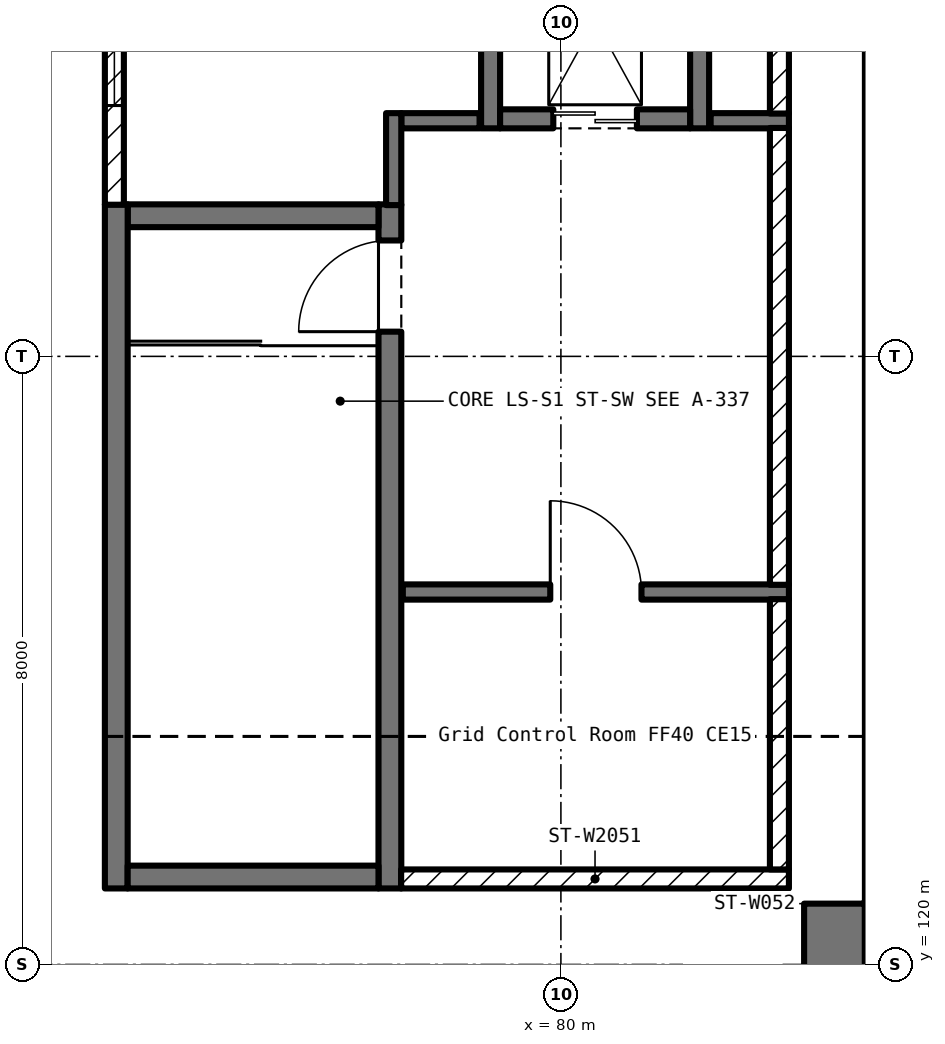
"""IFC4 building model, lengths in metres.
Left out: names, types, materials, properties, quantities, classifications, styles, units other than length and angle.
Written with IfcOpenShell. Run it as: python <this file> out.ifc"""

import sys

from ifc_helpers import new_model, si_unit, direction, frame, frame_2d, origin, place, context, subcontext, project, spatial, rectangle, extrude, element, fill, save


model = new_model("IFC4")
c1 = context("Model", 3, precision=1e-05, world=origin(), true_north=direction((0.0, 1.0)))
c2 = subcontext(c1, "Body", "Model", "MODEL_VIEW")
j1 = project(units=[si_unit("LENGTHUNIT", "METRE"), si_unit("PLANEANGLEUNIT", "RADIAN")], contexts=[c1])
p1 = place(None, origin())
s1 = spatial("IfcSite", under=j1, at=p1, CompositionType="ELEMENT")
p2 = place(p1, origin())
s2 = spatial("IfcBuilding", under=s1, at=p2, CompositionType="ELEMENT")
p3 = place(p2, frame((0.0, 0.0, 34.0)))
s3 = spatial("IfcBuildingStorey", under=s2, at=p3, CompositionType="ELEMENT", Elevation=34.0)
p4 = place(p3, frame((83.6, 95.2, 0.0), z_axis=(0.0, 0.0, 1.0), x_axis=(0.0, 1.0, 0.0)))
e1 = element("IfcWall", 1, at=p4, inside=s3, PredefinedType="SHEAR", context=c2, shape_type="SweptSolid", body=[
    extrude(rectangle(XDim=25.6, YDim=0.8, at=frame_2d((12.8, 0.0))), origin(), (0.0, 0.0, 1.0), 12.5),
])
p5 = place(p4, frame((1.1, 0.0, 2.6)))
e2 = element("IfcOpeningElement", 2, at=p5, cuts=e1, PredefinedType="OPENING", context=c2, shape_type="SweptSolid", body=[
    extrude(rectangle(XDim=2.4, YDim=1.2, at=frame_2d((1.2, 0.6))), frame((0.0, 0.412, 0.0), z_axis=(0.0, -1.0, 0.0), x_axis=(1.0, 0.0, 0.0)), (0.0, 0.0, 1.0), 0.824),
])
p6 = place(p4, frame((4.1, 0.0, 2.6)))
e3 = element("IfcOpeningElement", 3, at=p6, cuts=e1, PredefinedType="OPENING", context=c2, shape_type="SweptSolid", body=[
    extrude(rectangle(XDim=2.4, YDim=1.2, at=frame_2d((1.2, 0.6))), frame((0.0, 0.412, 0.0), z_axis=(0.0, -1.0, 0.0), x_axis=(1.0, 0.0, 0.0)), (0.0, 0.0, 1.0), 0.824),
])
p7 = place(p4, frame((7.1, 0.0, 2.6)))
e4 = element("IfcOpeningElement", 4, at=p7, cuts=e1, PredefinedType="OPENING", context=c2, shape_type="SweptSolid", body=[
    extrude(rectangle(XDim=2.4, YDim=1.2, at=frame_2d((1.2, 0.6))), frame((0.0, 0.412, 0.0), z_axis=(0.0, -1.0, 0.0), x_axis=(1.0, 0.0, 0.0)), (0.0, 0.0, 1.0), 0.824),
])
p8 = place(p4, frame((10.1, 0.0, 2.6)))
e5 = element("IfcOpeningElement", 5, at=p8, cuts=e1, PredefinedType="OPENING", context=c2, shape_type="SweptSolid", body=[
    extrude(rectangle(XDim=2.4, YDim=1.2, at=frame_2d((1.2, 0.6))), frame((0.0, 0.412, 0.0), z_axis=(0.0, -1.0, 0.0), x_axis=(1.0, 0.0, 0.0)), (0.0, 0.0, 1.0), 0.824),
])
p9 = place(p4, frame((13.1, 0.0, 2.6)))
e6 = element("IfcOpeningElement", 6, at=p9, cuts=e1, PredefinedType="OPENING", context=c2, shape_type="SweptSolid", body=[
    extrude(rectangle(XDim=2.4, YDim=1.2, at=frame_2d((1.2, 0.6))), frame((0.0, 0.412, 0.0), z_axis=(0.0, -1.0, 0.0), x_axis=(1.0, 0.0, 0.0)), (0.0, 0.0, 1.0), 0.824),
])
p10 = place(p4, frame((16.1, 0.0, 2.6)))
e7 = element("IfcOpeningElement", 7, at=p10, cuts=e1, PredefinedType="OPENING", context=c2, shape_type="SweptSolid", body=[
    extrude(rectangle(XDim=2.4, YDim=1.2, at=frame_2d((1.2, 0.6))), frame((0.0, 0.412, 0.0), z_axis=(0.0, -1.0, 0.0), x_axis=(1.0, 0.0, 0.0)), (0.0, 0.0, 1.0), 0.824),
])
p11 = place(p4, frame((19.1, 0.0, 2.6)))
e8 = element("IfcOpeningElement", 8, at=p11, cuts=e1, PredefinedType="OPENING", context=c2, shape_type="SweptSolid", body=[
    extrude(rectangle(XDim=2.4, YDim=1.2, at=frame_2d((1.2, 0.6))), frame((0.0, 0.412, 0.0), z_axis=(0.0, -1.0, 0.0), x_axis=(1.0, 0.0, 0.0)), (0.0, 0.0, 1.0), 0.824),
])
p12 = place(p4, frame((22.1, 0.0, 2.6)))
e9 = element("IfcOpeningElement", 9, at=p12, cuts=e1, PredefinedType="OPENING", context=c2, shape_type="SweptSolid", body=[
    extrude(rectangle(XDim=2.4, YDim=1.2, at=frame_2d((1.2, 0.6))), frame((0.0, 0.412, 0.0), z_axis=(0.0, -1.0, 0.0), x_axis=(1.0, 0.0, 0.0)), (0.0, 0.0, 1.0), 0.824),
])
p13 = place(p4, frame((1.1, 0.0, 9.1)))
e10 = element("IfcOpeningElement", 10, at=p13, cuts=e1, PredefinedType="OPENING", context=c2, shape_type="SweptSolid", body=[
    extrude(rectangle(XDim=2.4, YDim=0.9, at=frame_2d((1.2, 0.45))), frame((0.0, 0.412, 0.0), z_axis=(0.0, -1.0, 0.0), x_axis=(1.0, 0.0, 0.0)), (0.0, 0.0, 1.0), 0.824),
])
p14 = place(p4, frame((4.1, 0.0, 9.1)))
e11 = element("IfcOpeningElement", 11, at=p14, cuts=e1, PredefinedType="OPENING", context=c2, shape_type="SweptSolid", body=[
    extrude(rectangle(XDim=2.4, YDim=0.9, at=frame_2d((1.2, 0.45))), frame((0.0, 0.412, 0.0), z_axis=(0.0, -1.0, 0.0), x_axis=(1.0, 0.0, 0.0)), (0.0, 0.0, 1.0), 0.824),
])
p15 = place(p4, frame((7.1, 0.0, 9.1)))
e12 = element("IfcOpeningElement", 12, at=p15, cuts=e1, PredefinedType="OPENING", context=c2, shape_type="SweptSolid", body=[
    extrude(rectangle(XDim=2.4, YDim=0.9, at=frame_2d((1.2, 0.45))), frame((0.0, 0.412, 0.0), z_axis=(0.0, -1.0, 0.0), x_axis=(1.0, 0.0, 0.0)), (0.0, 0.0, 1.0), 0.824),
])
p16 = place(p4, frame((10.1, 0.0, 9.1)))
e13 = element("IfcOpeningElement", 13, at=p16, cuts=e1, PredefinedType="OPENING", context=c2, shape_type="SweptSolid", body=[
    extrude(rectangle(XDim=2.4, YDim=0.9, at=frame_2d((1.2, 0.45))), frame((0.0, 0.412, 0.0), z_axis=(0.0, -1.0, 0.0), x_axis=(1.0, 0.0, 0.0)), (0.0, 0.0, 1.0), 0.824),
])
p17 = place(p4, frame((13.1, 0.0, 9.1)))
e14 = element("IfcOpeningElement", 14, at=p17, cuts=e1, PredefinedType="OPENING", context=c2, shape_type="SweptSolid", body=[
    extrude(rectangle(XDim=2.4, YDim=0.9, at=frame_2d((1.2, 0.45))), frame((0.0, 0.412, 0.0), z_axis=(0.0, -1.0, 0.0), x_axis=(1.0, 0.0, 0.0)), (0.0, 0.0, 1.0), 0.824),
])
p18 = place(p4, frame((16.1, 0.0, 9.1)))
e15 = element("IfcOpeningElement", 15, at=p18, cuts=e1, PredefinedType="OPENING", context=c2, shape_type="SweptSolid", body=[
    extrude(rectangle(XDim=2.4, YDim=0.9, at=frame_2d((1.2, 0.45))), frame((0.0, 0.412, 0.0), z_axis=(0.0, -1.0, 0.0), x_axis=(1.0, 0.0, 0.0)), (0.0, 0.0, 1.0), 0.824),
])
p19 = place(p4, frame((19.1, 0.0, 9.1)))
e16 = element("IfcOpeningElement", 16, at=p19, cuts=e1, PredefinedType="OPENING", context=c2, shape_type="SweptSolid", body=[
    extrude(rectangle(XDim=2.4, YDim=0.9, at=frame_2d((1.2, 0.45))), frame((0.0, 0.412, 0.0), z_axis=(0.0, -1.0, 0.0), x_axis=(1.0, 0.0, 0.0)), (0.0, 0.0, 1.0), 0.824),
])
p20 = place(p4, frame((22.1, 0.0, 9.1)))
e17 = element("IfcOpeningElement", 17, at=p20, cuts=e1, PredefinedType="OPENING", context=c2, shape_type="SweptSolid", body=[
    extrude(rectangle(XDim=2.4, YDim=0.9, at=frame_2d((1.2, 0.45))), frame((0.0, 0.412, 0.0), z_axis=(0.0, -1.0, 0.0), x_axis=(1.0, 0.0, 0.0)), (0.0, 0.0, 1.0), 0.824),
])
p21 = place(p3, frame((77.75, 121.0, 0.0), z_axis=(0.0, 0.0, 1.0), x_axis=(0.0, 1.0, 0.0)))
e18 = element("IfcWall", 18, at=p21, inside=s3, PredefinedType="SOLIDWALL", context=c2, shape_type="SweptSolid", body=[
    extrude(rectangle(XDim=9.0, YDim=0.3, at=frame_2d((4.5, 0.0))), origin(), (0.0, 0.0, 1.0), 5.75),
])
p22 = place(p21, frame((7.325, 0.0, 0.0)))
e19 = element("IfcOpeningElement", 19, at=p22, cuts=e18, PredefinedType="OPENING", context=c2, shape_type="SweptSolid", body=[
    extrude(rectangle(XDim=1.2, YDim=2.1, at=frame_2d((0.6, 1.05))), frame((0.0, 0.162, 0.0), z_axis=(0.0, -1.0, 0.0), x_axis=(1.0, 0.0, 0.0)), (0.0, 0.0, 1.0), 0.324),
])
p23 = place(p3, frame((77.6, 129.85, 0.0), z_axis=(0.0, 0.0, 1.0), x_axis=(-1.0, 0.0, 0.0)))
e20 = element("IfcWall", 20, at=p23, inside=s3, PredefinedType="SOLIDWALL", context=c2, shape_type="SweptSolid", body=[
    extrude(rectangle(XDim=3.3, YDim=0.3, at=frame_2d((1.65, 0.0))), origin(), (0.0, 0.0, 1.0), 5.75),
])
p24 = place(p3, frame((74.15, 130.0, 0.0), z_axis=(0.0, 0.0, 1.0), x_axis=(0.0, -1.0, 0.0)))
e21 = element("IfcWall", 21, at=p24, inside=s3, PredefinedType="SOLIDWALL", context=c2, shape_type="SweptSolid", body=[
    extrude(rectangle(XDim=9.0, YDim=0.3, at=frame_2d((4.5, 0.0))), origin(), (0.0, 0.0, 1.0), 5.75),
])
p25 = place(p3, frame((74.3, 121.15, 0.0), z_axis=(0.0, 0.0, 1.0), x_axis=(1.0, 0.0, 0.0)))
e22 = element("IfcWall", 22, at=p25, inside=s3, PredefinedType="SOLIDWALL", context=c2, shape_type="SweptSolid", body=[
    extrude(rectangle(XDim=3.3, YDim=0.3, at=frame_2d((1.65, 0.0))), origin(), (0.0, 0.0, 1.0), 5.75),
])
for number, where, z_axis, x_axis in (
    (23, (81.825, 131.0, 0.0), (0.0, 0.0, 1.0), (0.0, 1.0, 0.0)),
    (24, (79.075, 135.0, 0.0), (0.0, 0.0, 1.0), (0.0, -1.0, 0.0)),
):
    element("IfcWall", number, at=place(p3, frame(where, z_axis=z_axis, x_axis=x_axis)), inside=s3, PredefinedType="SOLIDWALL", context=c2, shape_type="SweptSolid", body=[
        extrude(rectangle(XDim=4.0, YDim=0.25, at=frame_2d((2.0, 0.0))), origin(), (0.0, 0.0, 1.0), 5.75),
    ])
p26 = place(p3, frame((79.2, 131.125, 0.0), z_axis=(0.0, 0.0, 1.0), x_axis=(1.0, 0.0, 0.0)))
e25 = element("IfcWall", 25, at=p26, inside=s3, PredefinedType="SOLIDWALL", context=c2, shape_type="SweptSolid", body=[
    extrude(rectangle(XDim=2.5, YDim=0.25, at=frame_2d((1.25, 0.0))), origin(), (0.0, 0.0, 1.0), 5.75),
])
p27 = place(p26, frame((0.7, 0.0, 0.0)))
e26 = element("IfcOpeningElement", 26, at=p27, cuts=e25, PredefinedType="OPENING", context=c2, shape_type="SweptSolid", body=[
    extrude(rectangle(XDim=1.1, YDim=2.1, at=frame_2d((0.55, 1.05))), frame((0.0, 0.137, 0.0), z_axis=(0.0, -1.0, 0.0), x_axis=(1.0, 0.0, 0.0)), (0.0, 0.0, 1.0), 0.274),
])
for number, where, z_axis, x_axis in (
    (27, (83.0, 131.1, 0.0), (0.0, 0.0, 1.0), (-1.0, 0.0, 0.0)),
    (28, (78.93, 131.1, 0.0), (0.0, 0.0, 1.0), (-1.0, 0.0, 0.0)),
):
    element("IfcWall", number, at=place(p3, frame(where, z_axis=z_axis, x_axis=x_axis)), inside=s3, PredefinedType="PARTITIONING", context=c2, shape_type="SweptSolid", body=[
        extrude(rectangle(XDim=1.03, YDim=0.2, at=frame_2d((0.515, 0.0))), origin(), (0.0, 0.0, 1.0), 5.75),
    ])
p28 = place(p3, frame((77.8, 131.2, 0.0), z_axis=(0.0, 0.0, 1.0), x_axis=(0.0, -1.0, 0.0)))
e29 = element("IfcWall", 29, at=p28, inside=s3, PredefinedType="PARTITIONING", context=c2, shape_type="SweptSolid", body=[
    extrude(rectangle(XDim=1.21, YDim=0.2, at=frame_2d((0.605, 0.0))), origin(), (0.0, 0.0, 1.0), 5.75),
])
p29 = place(p3, frame((77.92, 124.9, 0.0), z_axis=(0.0, 0.0, 1.0), x_axis=(1.0, 0.0, 0.0)))
e30 = element("IfcWall", 30, at=p29, inside=s3, PredefinedType="PARTITIONING", context=c2, shape_type="SweptSolid", body=[
    extrude(rectangle(XDim=5.08, YDim=0.2, at=frame_2d((2.54, 0.0))), origin(), (0.0, 0.0, 1.0), 5.75),
])
p30 = place(p29, frame((1.94, 0.0, 0.0)))
e31 = element("IfcOpeningElement", 31, at=p30, cuts=e30, PredefinedType="OPENING", context=c2, shape_type="SweptSolid", body=[
    extrude(rectangle(XDim=1.2, YDim=2.1, at=frame_2d((0.6, 1.05))), frame((0.0, 0.112, 0.0), z_axis=(0.0, -1.0, 0.0), x_axis=(1.0, 0.0, 0.0)), (0.0, 0.0, 1.0), 0.224),
])
p31 = place(p3, frame((77.898, 121.125, 0.0), z_axis=(0.0, 0.0, 1.0), x_axis=(1.0, 0.0, 0.0)))
e32 = element("IfcWall", 32, at=p31, inside=s3, PredefinedType="SOLIDWALL", context=c2, shape_type="SweptSolid", body=[
    extrude(rectangle(XDim=5.102, YDim=0.25, at=frame_2d((2.551, 0.0))), origin(), (0.0, 0.0, 1.0), 5.75),
])
p32 = place(p3, frame((82.875, 121.25, 0.0), z_axis=(0.0, 0.0, 1.0), x_axis=(0.0, 1.0, 0.0)))
e33 = element("IfcWall", 33, at=p32, inside=s3, PredefinedType="SOLIDWALL", context=c2, shape_type="SweptSolid", body=[
    extrude(rectangle(XDim=3.555, YDim=0.25, at=frame_2d((1.777, 0.0))), origin(), (0.0, 0.0, 1.0), 5.75),
])
p33 = place(p3, frame((82.875, 124.995, 0.0), z_axis=(0.0, 0.0, 1.0), x_axis=(0.0, 1.0, 0.0)))
e34 = element("IfcWall", 34, at=p33, inside=s3, PredefinedType="SOLIDWALL", context=c2, shape_type="SweptSolid", body=[
    extrude(rectangle(XDim=6.01, YDim=0.25, at=frame_2d((3.005, 0.0))), origin(), (0.0, 0.0, 1.0), 5.75),
])
p34 = place(p3, frame((82.875, 131.195, 0.0), z_axis=(0.0, 0.0, 1.0), x_axis=(0.0, 1.0, 0.0)))
e35 = element("IfcWall", 35, at=p34, inside=s3, PredefinedType="SOLIDWALL", context=c2, shape_type="SweptSolid", body=[
    extrude(rectangle(XDim=3.805, YDim=0.25, at=frame_2d((1.902, 0.0))), origin(), (0.0, 0.0, 1.0), 5.75),
])
p35 = place(p3, frame((74.125, 134.75, 0.0), z_axis=(0.0, 0.0, 1.0), x_axis=(0.0, -1.0, 0.0)))
e36 = element("IfcWall", 36, at=p35, inside=s3, PredefinedType="SOLIDWALL", context=c2, shape_type="SweptSolid", body=[
    extrude(rectangle(XDim=4.755, YDim=0.25, at=frame_2d((2.377, 0.0))), origin(), (0.0, 0.0, 1.0), 5.75),
])
p36 = place(p35, frame((1.05, 0.0, 2.6)))
e37 = element("IfcOpeningElement", 37, at=p36, cuts=e36, PredefinedType="OPENING", context=c2, shape_type="SweptSolid", body=[
    extrude(rectangle(XDim=2.4, YDim=1.2, at=frame_2d((1.2, 0.6))), frame((0.0, 0.137, 0.0), z_axis=(0.0, -1.0, 0.0), x_axis=(1.0, 0.0, 0.0)), (0.0, 0.0, 1.0), 0.274),
])
p37 = place(p22, origin())
e38 = element("IfcDoor", 38, at=p37, inside=s3, OperationType="SINGLE_SWING_LEFT", PredefinedType="DOOR", context=c2, shape_type="SweptSolid", body=[
    extrude(rectangle(XDim=1.2, YDim=2.1, at=frame_2d((0.6, 1.05))), frame((0.0, 0.025, 0.0), z_axis=(0.0, -1.0, 0.0), x_axis=(1.0, 0.0, 0.0)), (0.0, 0.0, 1.0), 0.05),
])
fill(e19, e38)
p38 = place(p27, origin())
e39 = element("IfcDoor", 39, at=p38, inside=s3, OperationType="DOUBLE_DOOR_SLIDING", PredefinedType="DOOR", context=c2, shape_type="SweptSolid", body=[
    extrude(rectangle(XDim=1.1, YDim=2.1, at=frame_2d((0.55, 1.05))), frame((0.0, 0.025, 0.0), z_axis=(0.0, -1.0, 0.0), x_axis=(1.0, 0.0, 0.0)), (0.0, 0.0, 1.0), 0.05),
])
fill(e26, e39)
p39 = place(p30, origin())
e40 = element("IfcDoor", 40, at=p39, inside=s3, OperationType="SINGLE_SWING_LEFT", PredefinedType="DOOR", context=c2, shape_type="SweptSolid", body=[
    extrude(rectangle(XDim=1.2, YDim=2.1, at=frame_2d((0.6, 1.05))), frame((0.0, 0.025, 0.0), z_axis=(0.0, -1.0, 0.0), x_axis=(1.0, 0.0, 0.0)), (0.0, 0.0, 1.0), 0.05),
])
fill(e31, e40)
p40 = place(p36, origin())
e41 = element("IfcWindow", 41, at=p40, inside=s3, PartitioningType="SINGLE_PANEL", PredefinedType="WINDOW", context=c2, shape_type="SweptSolid", body=[
    extrude(rectangle(XDim=2.4, YDim=1.2, at=frame_2d((1.2, 0.6))), frame((0.0, 0.03, 0.0), z_axis=(0.0, -1.0, 0.0), x_axis=(1.0, 0.0, 0.0)), (0.0, 0.0, 1.0), 0.06),
])
fill(e37, e41)
save(model, sys.argv[1])
